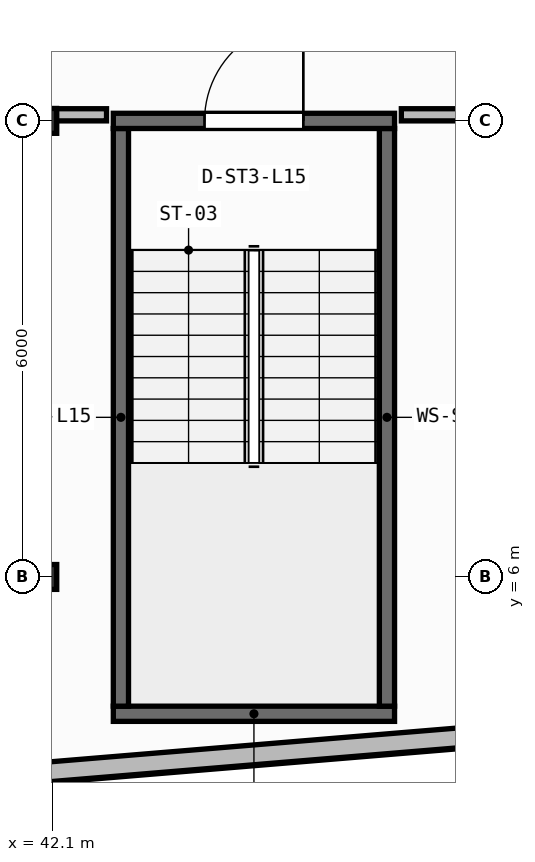
"""IFC4 building model, lengths in metres.
Left out: names, types, materials, properties, quantities, classifications, styles, units other than length and angle.
Written with IfcOpenShell. Run it as: python <this file> out.ifc"""

import sys

from ifc_helpers import new_model, si_unit, direction, frame, frame_2d, origin, origin_2d, place, context, subcontext, project, spatial, rectangle, i_section, extrude, element, fill, save


model = new_model("IFC4")
c1 = context("Model", 3, precision=1e-05, world=origin(), true_north=direction((0.0, 1.0)))
c2 = subcontext(c1, "Body", "Model", "MODEL_VIEW")
j1 = project(units=[si_unit("LENGTHUNIT", "METRE"), si_unit("PLANEANGLEUNIT", "RADIAN")], contexts=[c1])
p1 = place(None, origin())
s1 = spatial("IfcSite", under=j1, at=p1, CompositionType="ELEMENT")
p2 = place(p1, origin())
s2 = spatial("IfcBuilding", under=s1, at=p2, CompositionType="ELEMENT")
p3 = place(p2, frame((0.0, 0.0, 62.0)))
s3 = spatial("IfcBuildingStorey", under=s2, at=p3, CompositionType="ELEMENT", Elevation=62.0)
for number, where, z_axis, x_axis in (
    (1, (42.0, 6.0, 0.0), (0.0, 0.0, 1.0), (1.0, 0.0, 0.0)),
    (2, (42.0, 12.0, 0.0), (0.0, 0.0, 1.0), (1.0, 0.0, 0.0)),
):
    element("IfcColumn", number, at=place(p3, frame(where, z_axis=z_axis, x_axis=x_axis)), inside=s3, PredefinedType="COLUMN", context=c2, shape_type="SweptSolid", body=[
        extrude(i_section(OverallWidth=0.311, OverallDepth=0.327, WebThickness=0.016, FlangeThickness=0.025, FilletRadius=0.017, at=origin_2d()), origin(), (0.0, 0.0, 1.0), 3.95),
    ])
p4 = place(p3, frame((2.76, 0.174, 0.0), z_axis=(0.0, 0.0, 1.0), x_axis=(0.996571478456, 0.082736257641, 0.0)))
e3 = element("IfcWall", 3, at=p4, inside=s3, PredefinedType="STANDARD", context=c2, shape_type="SweptSolid", body=[
    extrude(rectangle(XDim=52.861, YDim=0.26, at=frame_2d((26.431, 0.0))), origin(), (0.0, 0.0, 1.0), 3.71),
])
p5 = place(p4, frame((25.231, 0.0, 0.9)))
e4 = element("IfcOpeningElement", 4, at=p5, cuts=e3, PredefinedType="OPENING", context=c2, shape_type="SweptSolid", body=[
    extrude(rectangle(XDim=2.4, YDim=1.65, at=frame_2d((1.2, 0.825))), frame((0.0, 0.14, 0.0), z_axis=(0.0, -1.0, 0.0), x_axis=(1.0, 0.0, 0.0)), (0.0, 0.0, 1.0), 0.28),
])
p6 = place(p3, frame((42.9, 4.2, 0.0), z_axis=(0.0, 0.0, 1.0), x_axis=(1.0, 0.0, 0.0)))
e5 = element("IfcWall", 5, at=p6, inside=s3, PredefinedType="SHEAR", context=c2, shape_type="SweptSolid", body=[
    extrude(rectangle(XDim=3.7, YDim=0.2, at=frame_2d((1.85, 0.0))), origin(), (0.0, 0.0, 1.0), 3.71),
])
for number, where, z_axis, x_axis in (
    (6, (43.0, 4.3, 0.0), (0.0, 0.0, 1.0), (0.0, 1.0, 0.0)),
    (7, (46.5, 4.3, 0.0), (0.0, 0.0, 1.0), (0.0, 1.0, 0.0)),
):
    element("IfcWall", number, at=place(p3, frame(where, z_axis=z_axis, x_axis=x_axis)), inside=s3, PredefinedType="SHEAR", context=c2, shape_type="SweptSolid", body=[
        extrude(rectangle(XDim=7.6, YDim=0.2, at=frame_2d((3.8, 0.0))), origin(), (0.0, 0.0, 1.0), 3.71),
    ])
p7 = place(p3, frame((42.9, 12.0, 0.0), z_axis=(0.0, 0.0, 1.0), x_axis=(1.0, 0.0, 0.0)))
e8 = element("IfcWall", 8, at=p7, inside=s3, PredefinedType="SHEAR", context=c2, shape_type="SweptSolid", body=[
    extrude(rectangle(XDim=3.7, YDim=0.2, at=frame_2d((1.85, 0.0))), origin(), (0.0, 0.0, 1.0), 3.71),
])
p8 = place(p7, frame((1.2, 0.0, 0.0)))
e9 = element("IfcOpeningElement", 9, at=p8, cuts=e8, PredefinedType="OPENING", context=c2, shape_type="SweptSolid", body=[
    extrude(rectangle(XDim=1.3, YDim=2.15, at=frame_2d((0.65, 1.075))), frame((0.0, 0.11, 0.0), z_axis=(0.0, -1.0, 0.0), x_axis=(1.0, 0.0, 0.0)), (0.0, 0.0, 1.0), 0.22),
])
p9 = place(p3, frame((31.63, 12.08, 0.0), z_axis=(0.0, 0.0, 1.0), x_axis=(1.0, 0.0, 0.0)))
e10 = element("IfcWall", 10, at=p9, inside=s3, PredefinedType="PARTITIONING", context=c2, shape_type="SweptSolid", body=[
    extrude(rectangle(XDim=11.181, YDim=0.16, at=frame_2d((5.59, 0.0))), origin(), (0.0, 0.0, 1.0), 3.073),
])
p10 = place(p3, frame((46.689, 12.08, 0.0), z_axis=(0.0, 0.0, 1.0), x_axis=(1.0, 0.0, 0.0)))
e11 = element("IfcWall", 11, at=p10, inside=s3, PredefinedType="PARTITIONING", context=c2, shape_type="SweptSolid", body=[
    extrude(rectangle(XDim=3.011, YDim=0.16, at=frame_2d((1.505, 0.0))), origin(), (0.0, 0.0, 1.0), 3.073),
])
p11 = place(p8, origin())
e12 = element("IfcDoor", 12, at=p11, inside=s3, OperationType="SINGLE_SWING_RIGHT", PredefinedType="DOOR", context=c2, shape_type="SweptSolid", body=[
    extrude(rectangle(XDim=1.3, YDim=2.15, at=frame_2d((0.65, 1.075))), frame((0.0, 0.025, 0.0), z_axis=(0.0, -1.0, 0.0), x_axis=(1.0, 0.0, 0.0)), (0.0, 0.0, 1.0), 0.05),
])
fill(e9, e12)
save(model, sys.argv[1])
